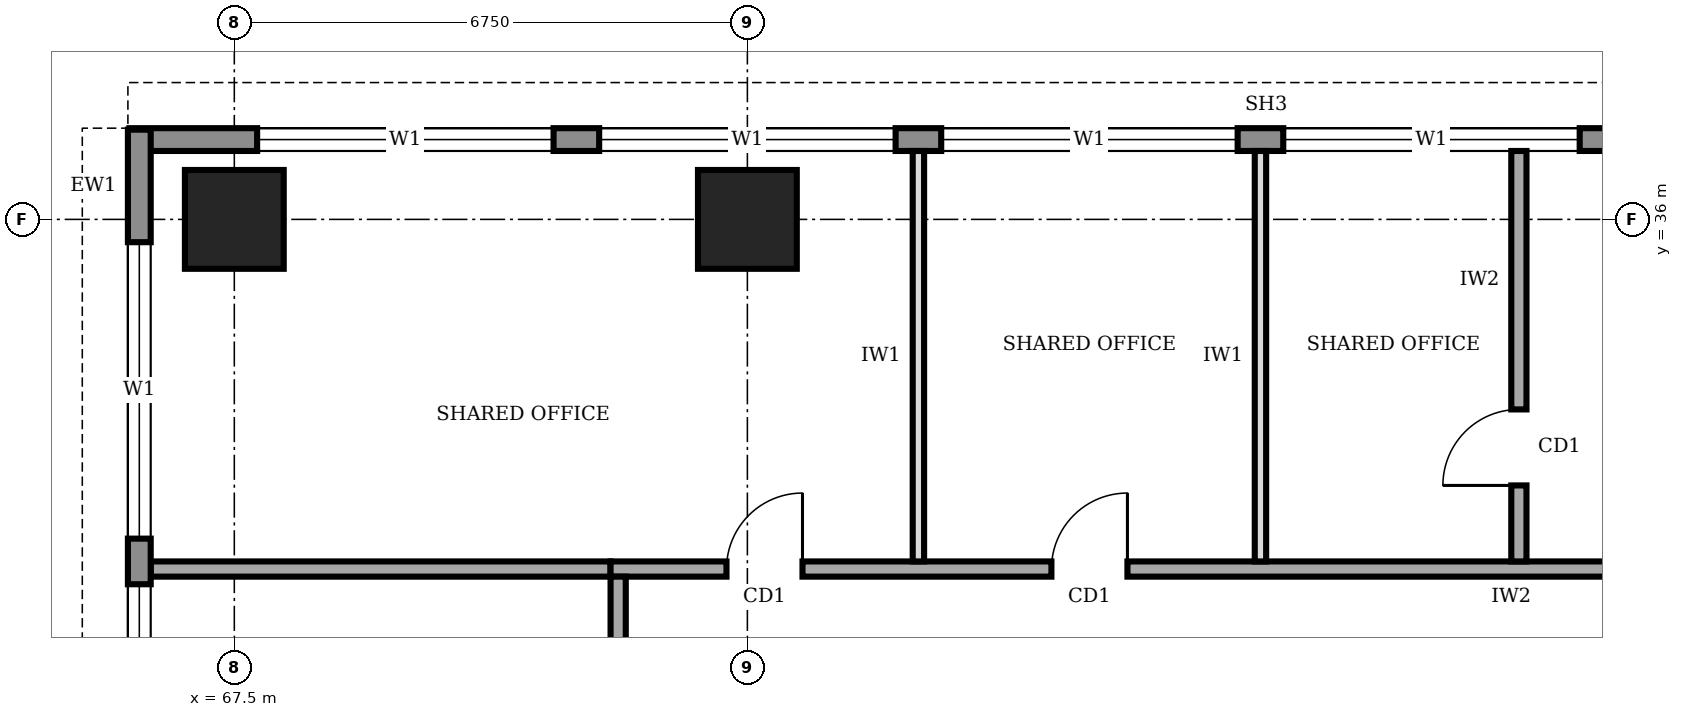
"""IFC4 building model, lengths in metres.
Left out: names, types, materials, properties, quantities, classifications, styles, units other than length and angle.
Written with IfcOpenShell. Run it as: python <this file> out.ifc"""

import sys

from ifc_helpers import new_model, si_unit, direction, frame, frame_2d, origin, origin_2d, place, context, subcontext, project, spatial, rectangle, extrude, element, fill, save


model = new_model("IFC4")
c1 = context("Model", 3, precision=1e-05, world=origin(), true_north=direction((0.0, 1.0)))
c2 = subcontext(c1, "Body", "Model", "MODEL_VIEW")
j1 = project(units=[si_unit("LENGTHUNIT", "METRE"), si_unit("PLANEANGLEUNIT", "RADIAN")], contexts=[c1])
p1 = place(None, origin())
s1 = spatial("IfcSite", under=j1, at=p1, CompositionType="ELEMENT")
p2 = place(p1, origin())
s2 = spatial("IfcBuilding", under=s1, at=p2, CompositionType="ELEMENT")
p3 = place(p2, frame((0.0, 0.0, 213.0)))
s3 = spatial("IfcBuildingStorey", under=s2, at=p3, CompositionType="ELEMENT", Elevation=213.0)
for number, where, z_axis, x_axis in (
    (1, (67.5, 36.0, 0.0), (0.0, 0.0, 1.0), (1.0, 0.0, 0.0)),
    (2, (74.25, 36.0, 0.0), (0.0, 0.0, 1.0), (1.0, 0.0, 0.0)),
):
    element("IfcColumn", number, at=place(p3, frame(where, z_axis=z_axis, x_axis=x_axis)), inside=s3, PredefinedType="COLUMN", context=c2, shape_type="SweptSolid", body=[
        extrude(rectangle(XDim=1.3, YDim=1.3, at=origin_2d()), origin(), (0.0, 0.0, 1.0), 4.0),
    ])
p4 = place(p3, frame((96.03, 37.05, 0.0), z_axis=(0.0, 0.0, 1.0), x_axis=(-1.0, 0.0, 0.0)))
e3 = element("IfcWall", 3, at=p4, inside=s3, PredefinedType="STANDARD", context=c2, shape_type="SweptSolid", body=[
    extrude(rectangle(XDim=29.91, YDim=0.3, at=frame_2d((14.955, 0.0))), origin(), (0.0, 0.0, 1.0), 3.75),
])
p5 = place(p4, frame((24.33, 0.0, 0.9)))
e4 = element("IfcOpeningElement", 4, at=p5, cuts=e3, PredefinedType="OPENING", context=c2, shape_type="SweptSolid", body=[
    extrude(rectangle(XDim=3.9, YDim=2.2, at=frame_2d((1.95, 1.1))), frame((0.0, 0.16, 0.0), z_axis=(0.0, -1.0, 0.0), x_axis=(1.0, 0.0, 0.0)), (0.0, 0.0, 1.0), 0.32),
])
p6 = place(p4, frame((19.83, 0.0, 0.9)))
e5 = element("IfcOpeningElement", 5, at=p6, cuts=e3, PredefinedType="OPENING", context=c2, shape_type="SweptSolid", body=[
    extrude(rectangle(XDim=3.9, YDim=2.2, at=frame_2d((1.95, 1.1))), frame((0.0, 0.16, 0.0), z_axis=(0.0, -1.0, 0.0), x_axis=(1.0, 0.0, 0.0)), (0.0, 0.0, 1.0), 0.32),
])
p7 = place(p4, frame((15.33, 0.0, 0.9)))
e6 = element("IfcOpeningElement", 6, at=p7, cuts=e3, PredefinedType="OPENING", context=c2, shape_type="SweptSolid", body=[
    extrude(rectangle(XDim=3.9, YDim=2.2, at=frame_2d((1.95, 1.1))), frame((0.0, 0.16, 0.0), z_axis=(0.0, -1.0, 0.0), x_axis=(1.0, 0.0, 0.0)), (0.0, 0.0, 1.0), 0.32),
])
p8 = place(p4, frame((10.83, 0.0, 0.9)))
e7 = element("IfcOpeningElement", 7, at=p8, cuts=e3, PredefinedType="OPENING", context=c2, shape_type="SweptSolid", body=[
    extrude(rectangle(XDim=3.9, YDim=2.2, at=frame_2d((1.95, 1.1))), frame((0.0, 0.16, 0.0), z_axis=(0.0, -1.0, 0.0), x_axis=(1.0, 0.0, 0.0)), (0.0, 0.0, 1.0), 0.32),
])
p9 = place(p4, frame((6.33, 0.0, 0.9)))
e8 = element("IfcOpeningElement", 8, at=p9, cuts=e3, PredefinedType="OPENING", context=c2, shape_type="SweptSolid", body=[
    extrude(rectangle(XDim=3.9, YDim=2.2, at=frame_2d((1.95, 1.1))), frame((0.0, 0.16, 0.0), z_axis=(0.0, -1.0, 0.0), x_axis=(1.0, 0.0, 0.0)), (0.0, 0.0, 1.0), 0.32),
])
p10 = place(p4, frame((1.83, 0.0, 0.9)))
e9 = element("IfcOpeningElement", 9, at=p10, cuts=e3, PredefinedType="OPENING", context=c2, shape_type="SweptSolid", body=[
    extrude(rectangle(XDim=3.9, YDim=2.2, at=frame_2d((1.95, 1.1))), frame((0.0, 0.16, 0.0), z_axis=(0.0, -1.0, 0.0), x_axis=(1.0, 0.0, 0.0)), (0.0, 0.0, 1.0), 0.32),
])
p11 = place(p3, frame((66.25, 37.18, 0.0), z_axis=(0.0, 0.0, 1.0), x_axis=(0.0, -1.0, 0.0)))
e10 = element("IfcWall", 10, at=p11, inside=s3, PredefinedType="STANDARD", context=c2, shape_type="SweptSolid", body=[
    extrude(rectangle(XDim=33.86, YDim=0.3, at=frame_2d((16.93, 0.0))), origin(), (0.0, 0.0, 1.0), 3.75),
])
p12 = place(p11, frame((28.48, 0.0, 0.9)))
e11 = element("IfcOpeningElement", 11, at=p12, cuts=e10, PredefinedType="OPENING", context=c2, shape_type="SweptSolid", body=[
    extrude(rectangle(XDim=3.9, YDim=2.2, at=frame_2d((1.95, 1.1))), frame((0.0, 0.16, 0.0), z_axis=(0.0, -1.0, 0.0), x_axis=(1.0, 0.0, 0.0)), (0.0, 0.0, 1.0), 0.32),
])
p13 = place(p11, frame((23.98, 0.0, 0.9)))
e12 = element("IfcOpeningElement", 12, at=p13, cuts=e10, PredefinedType="OPENING", context=c2, shape_type="SweptSolid", body=[
    extrude(rectangle(XDim=3.9, YDim=2.2, at=frame_2d((1.95, 1.1))), frame((0.0, 0.16, 0.0), z_axis=(0.0, -1.0, 0.0), x_axis=(1.0, 0.0, 0.0)), (0.0, 0.0, 1.0), 0.32),
])
p14 = place(p11, frame((19.48, 0.0, 0.9)))
e13 = element("IfcOpeningElement", 13, at=p14, cuts=e10, PredefinedType="OPENING", context=c2, shape_type="SweptSolid", body=[
    extrude(rectangle(XDim=3.9, YDim=2.2, at=frame_2d((1.95, 1.1))), frame((0.0, 0.16, 0.0), z_axis=(0.0, -1.0, 0.0), x_axis=(1.0, 0.0, 0.0)), (0.0, 0.0, 1.0), 0.32),
])
p15 = place(p11, frame((14.98, 0.0, 0.9)))
e14 = element("IfcOpeningElement", 14, at=p15, cuts=e10, PredefinedType="OPENING", context=c2, shape_type="SweptSolid", body=[
    extrude(rectangle(XDim=3.9, YDim=2.2, at=frame_2d((1.95, 1.1))), frame((0.0, 0.16, 0.0), z_axis=(0.0, -1.0, 0.0), x_axis=(1.0, 0.0, 0.0)), (0.0, 0.0, 1.0), 0.32),
])
p16 = place(p11, frame((10.48, 0.0, 0.9)))
e15 = element("IfcOpeningElement", 15, at=p16, cuts=e10, PredefinedType="OPENING", context=c2, shape_type="SweptSolid", body=[
    extrude(rectangle(XDim=3.9, YDim=2.2, at=frame_2d((1.95, 1.1))), frame((0.0, 0.16, 0.0), z_axis=(0.0, -1.0, 0.0), x_axis=(1.0, 0.0, 0.0)), (0.0, 0.0, 1.0), 0.32),
])
p17 = place(p11, frame((5.98, 0.0, 0.9)))
e16 = element("IfcOpeningElement", 16, at=p17, cuts=e10, PredefinedType="OPENING", context=c2, shape_type="SweptSolid", body=[
    extrude(rectangle(XDim=3.9, YDim=2.2, at=frame_2d((1.95, 1.1))), frame((0.0, 0.16, 0.0), z_axis=(0.0, -1.0, 0.0), x_axis=(1.0, 0.0, 0.0)), (0.0, 0.0, 1.0), 0.32),
])
p18 = place(p11, frame((1.48, 0.0, 0.9)))
e17 = element("IfcOpeningElement", 17, at=p18, cuts=e10, PredefinedType="OPENING", context=c2, shape_type="SweptSolid", body=[
    extrude(rectangle(XDim=3.9, YDim=2.2, at=frame_2d((1.95, 1.1))), frame((0.0, 0.16, 0.0), z_axis=(0.0, -1.0, 0.0), x_axis=(1.0, 0.0, 0.0)), (0.0, 0.0, 1.0), 0.32),
])
p19 = place(p3, frame((89.35, 31.4, 0.0), z_axis=(0.0, 0.0, 1.0), x_axis=(-1.0, 0.0, 0.0)))
e18 = element("IfcWall", 18, at=p19, inside=s3, PredefinedType="SOLIDWALL", context=c2, shape_type="SweptSolid", body=[
    extrude(rectangle(XDim=16.9, YDim=0.2, at=frame_2d((8.45, 0.0))), origin(), (0.0, 0.0, 1.0), 3.75),
])
p20 = place(p19, frame((14.375, 0.0, 0.0)))
e19 = element("IfcOpeningElement", 19, at=p20, cuts=e18, PredefinedType="OPENING", context=c2, shape_type="SweptSolid", body=[
    extrude(rectangle(XDim=1.0, YDim=2.1, at=frame_2d((0.5, 1.05))), frame((0.0, 0.11, 0.0), z_axis=(0.0, -1.0, 0.0), x_axis=(1.0, 0.0, 0.0)), (0.0, 0.0, 1.0), 0.22),
])
p21 = place(p19, frame((10.1, 0.0, 0.0)))
e20 = element("IfcOpeningElement", 20, at=p21, cuts=e18, PredefinedType="OPENING", context=c2, shape_type="SweptSolid", body=[
    extrude(rectangle(XDim=1.0, YDim=2.1, at=frame_2d((0.5, 1.05))), frame((0.0, 0.11, 0.0), z_axis=(0.0, -1.0, 0.0), x_axis=(1.0, 0.0, 0.0)), (0.0, 0.0, 1.0), 0.22),
])
p22 = place(p3, frame((72.55, 31.3, 0.0), z_axis=(0.0, 0.0, 1.0), x_axis=(0.0, -1.0, 0.0)))
e21 = element("IfcWall", 21, at=p22, inside=s3, PredefinedType="SOLIDWALL", context=c2, shape_type="SweptSolid", body=[
    extrude(rectangle(XDim=23.8, YDim=0.2, at=frame_2d((11.9, 0.0))), origin(), (0.0, 0.0, 1.0), 3.75),
])
p23 = place(p22, frame((18.05, 0.0, 0.0)))
e22 = element("IfcOpeningElement", 22, at=p23, cuts=e21, PredefinedType="OPENING", context=c2, shape_type="SweptSolid", body=[
    extrude(rectangle(XDim=1.0, YDim=2.1, at=frame_2d((0.5, 1.05))), frame((0.0, 0.11, 0.0), z_axis=(0.0, -1.0, 0.0), x_axis=(1.0, 0.0, 0.0)), (0.0, 0.0, 1.0), 0.22),
])
p24 = place(p22, frame((6.05, 0.0, 0.0)))
e23 = element("IfcOpeningElement", 23, at=p24, cuts=e21, PredefinedType="OPENING", context=c2, shape_type="SweptSolid", body=[
    extrude(rectangle(XDim=1.0, YDim=2.1, at=frame_2d((0.5, 1.05))), frame((0.0, 0.11, 0.0), z_axis=(0.0, -1.0, 0.0), x_axis=(1.0, 0.0, 0.0)), (0.0, 0.0, 1.0), 0.22),
])
p25 = place(p3, frame((84.4, 31.5, 0.0), z_axis=(0.0, 0.0, 1.0), x_axis=(0.0, 1.0, 0.0)))
e24 = element("IfcWall", 24, at=p25, inside=s3, PredefinedType="SOLIDWALL", context=c2, shape_type="SweptSolid", body=[
    extrude(rectangle(XDim=5.4, YDim=0.2, at=frame_2d((2.7, 0.0))), origin(), (0.0, 0.0, 1.0), 3.75),
])
p26 = place(p25, frame((1.0, 0.0, 0.0)))
e25 = element("IfcOpeningElement", 25, at=p26, cuts=e24, PredefinedType="OPENING", context=c2, shape_type="SweptSolid", body=[
    extrude(rectangle(XDim=1.0, YDim=2.1, at=frame_2d((0.5, 1.05))), frame((0.0, 0.11, 0.0), z_axis=(0.0, -1.0, 0.0), x_axis=(1.0, 0.0, 0.0)), (0.0, 0.0, 1.0), 0.22),
])
p27 = place(p3, frame((66.4, 31.4, 0.0), z_axis=(0.0, 0.0, 1.0), x_axis=(1.0, 0.0, 0.0)))
e26 = element("IfcWall", 26, at=p27, inside=s3, PredefinedType="SOLIDWALL", context=c2, shape_type="SweptSolid", body=[
    extrude(rectangle(XDim=6.05, YDim=0.2, at=frame_2d((3.025, 0.0))), origin(), (0.0, 0.0, 1.0), 3.75),
])
for number, where, z_axis, x_axis in (
    (27, (76.5, 31.5, 0.0), (0.0, 0.0, 1.0), (0.0, 1.0, 0.0)),
    (28, (81.0, 31.5, 0.0), (0.0, 0.0, 1.0), (0.0, 1.0, 0.0)),
):
    element("IfcWall", number, at=place(p3, frame(where, z_axis=z_axis, x_axis=x_axis)), inside=s3, PredefinedType="PARTITIONING", context=c2, shape_type="SweptSolid", body=[
        extrude(rectangle(XDim=5.4, YDim=0.15, at=frame_2d((2.7, 0.0))), origin(), (0.0, 0.0, 1.0), 3.75),
    ])
p28 = place(p5, origin())
e29 = element("IfcWindow", 29, at=p28, inside=s3, PartitioningType="SINGLE_PANEL", PredefinedType="WINDOW", context=c2, shape_type="SweptSolid", body=[
    extrude(rectangle(XDim=3.9, YDim=2.2, at=frame_2d((1.95, 1.1))), frame((0.0, 0.03, 0.0), z_axis=(0.0, -1.0, 0.0), x_axis=(1.0, 0.0, 0.0)), (0.0, 0.0, 1.0), 0.06),
])
fill(e4, e29)
p29 = place(p6, origin())
e30 = element("IfcWindow", 30, at=p29, inside=s3, PartitioningType="SINGLE_PANEL", PredefinedType="WINDOW", context=c2, shape_type="SweptSolid", body=[
    extrude(rectangle(XDim=3.9, YDim=2.2, at=frame_2d((1.95, 1.1))), frame((0.0, 0.03, 0.0), z_axis=(0.0, -1.0, 0.0), x_axis=(1.0, 0.0, 0.0)), (0.0, 0.0, 1.0), 0.06),
])
fill(e5, e30)
p30 = place(p7, origin())
e31 = element("IfcWindow", 31, at=p30, inside=s3, PartitioningType="SINGLE_PANEL", PredefinedType="WINDOW", context=c2, shape_type="SweptSolid", body=[
    extrude(rectangle(XDim=3.9, YDim=2.2, at=frame_2d((1.95, 1.1))), frame((0.0, 0.03, 0.0), z_axis=(0.0, -1.0, 0.0), x_axis=(1.0, 0.0, 0.0)), (0.0, 0.0, 1.0), 0.06),
])
fill(e6, e31)
p31 = place(p8, origin())
e32 = element("IfcWindow", 32, at=p31, inside=s3, PartitioningType="SINGLE_PANEL", PredefinedType="WINDOW", context=c2, shape_type="SweptSolid", body=[
    extrude(rectangle(XDim=3.9, YDim=2.2, at=frame_2d((1.95, 1.1))), frame((0.0, 0.03, 0.0), z_axis=(0.0, -1.0, 0.0), x_axis=(1.0, 0.0, 0.0)), (0.0, 0.0, 1.0), 0.06),
])
fill(e7, e32)
p32 = place(p17, origin())
e33 = element("IfcWindow", 33, at=p32, inside=s3, PartitioningType="SINGLE_PANEL", PredefinedType="WINDOW", context=c2, shape_type="SweptSolid", body=[
    extrude(rectangle(XDim=3.9, YDim=2.2, at=frame_2d((1.95, 1.1))), frame((0.0, 0.03, 0.0), z_axis=(0.0, -1.0, 0.0), x_axis=(1.0, 0.0, 0.0)), (0.0, 0.0, 1.0), 0.06),
])
fill(e16, e33)
p33 = place(p18, origin())
e34 = element("IfcWindow", 34, at=p33, inside=s3, PartitioningType="SINGLE_PANEL", PredefinedType="WINDOW", context=c2, shape_type="SweptSolid", body=[
    extrude(rectangle(XDim=3.9, YDim=2.2, at=frame_2d((1.95, 1.1))), frame((0.0, 0.03, 0.0), z_axis=(0.0, -1.0, 0.0), x_axis=(1.0, 0.0, 0.0)), (0.0, 0.0, 1.0), 0.06),
])
fill(e17, e34)
p34 = place(p20, frame((1.0, 0.0, 0.0), z_axis=(0.0, 0.0, 1.0), x_axis=(-1.0, 0.0, 0.0)))
e35 = element("IfcDoor", 35, at=p34, inside=s3, OperationType="SINGLE_SWING_RIGHT", PredefinedType="DOOR", context=c2, shape_type="SweptSolid", body=[
    extrude(rectangle(XDim=1.0, YDim=2.1, at=frame_2d((0.5, 1.05))), frame((0.0, 0.025, 0.0), z_axis=(0.0, -1.0, 0.0), x_axis=(1.0, 0.0, 0.0)), (0.0, 0.0, 1.0), 0.05),
])
fill(e19, e35)
p35 = place(p21, frame((1.0, 0.0, 0.0), z_axis=(0.0, 0.0, 1.0), x_axis=(-1.0, 0.0, 0.0)))
e36 = element("IfcDoor", 36, at=p35, inside=s3, OperationType="SINGLE_SWING_RIGHT", PredefinedType="DOOR", context=c2, shape_type="SweptSolid", body=[
    extrude(rectangle(XDim=1.0, YDim=2.1, at=frame_2d((0.5, 1.05))), frame((0.0, 0.025, 0.0), z_axis=(0.0, -1.0, 0.0), x_axis=(1.0, 0.0, 0.0)), (0.0, 0.0, 1.0), 0.05),
])
fill(e20, e36)
p36 = place(p26, origin())
e37 = element("IfcDoor", 37, at=p36, inside=s3, OperationType="SINGLE_SWING_LEFT", PredefinedType="DOOR", context=c2, shape_type="SweptSolid", body=[
    extrude(rectangle(XDim=1.0, YDim=2.1, at=frame_2d((0.5, 1.05))), frame((0.0, 0.025, 0.0), z_axis=(0.0, -1.0, 0.0), x_axis=(1.0, 0.0, 0.0)), (0.0, 0.0, 1.0), 0.05),
])
fill(e25, e37)
save(model, sys.argv[1])
